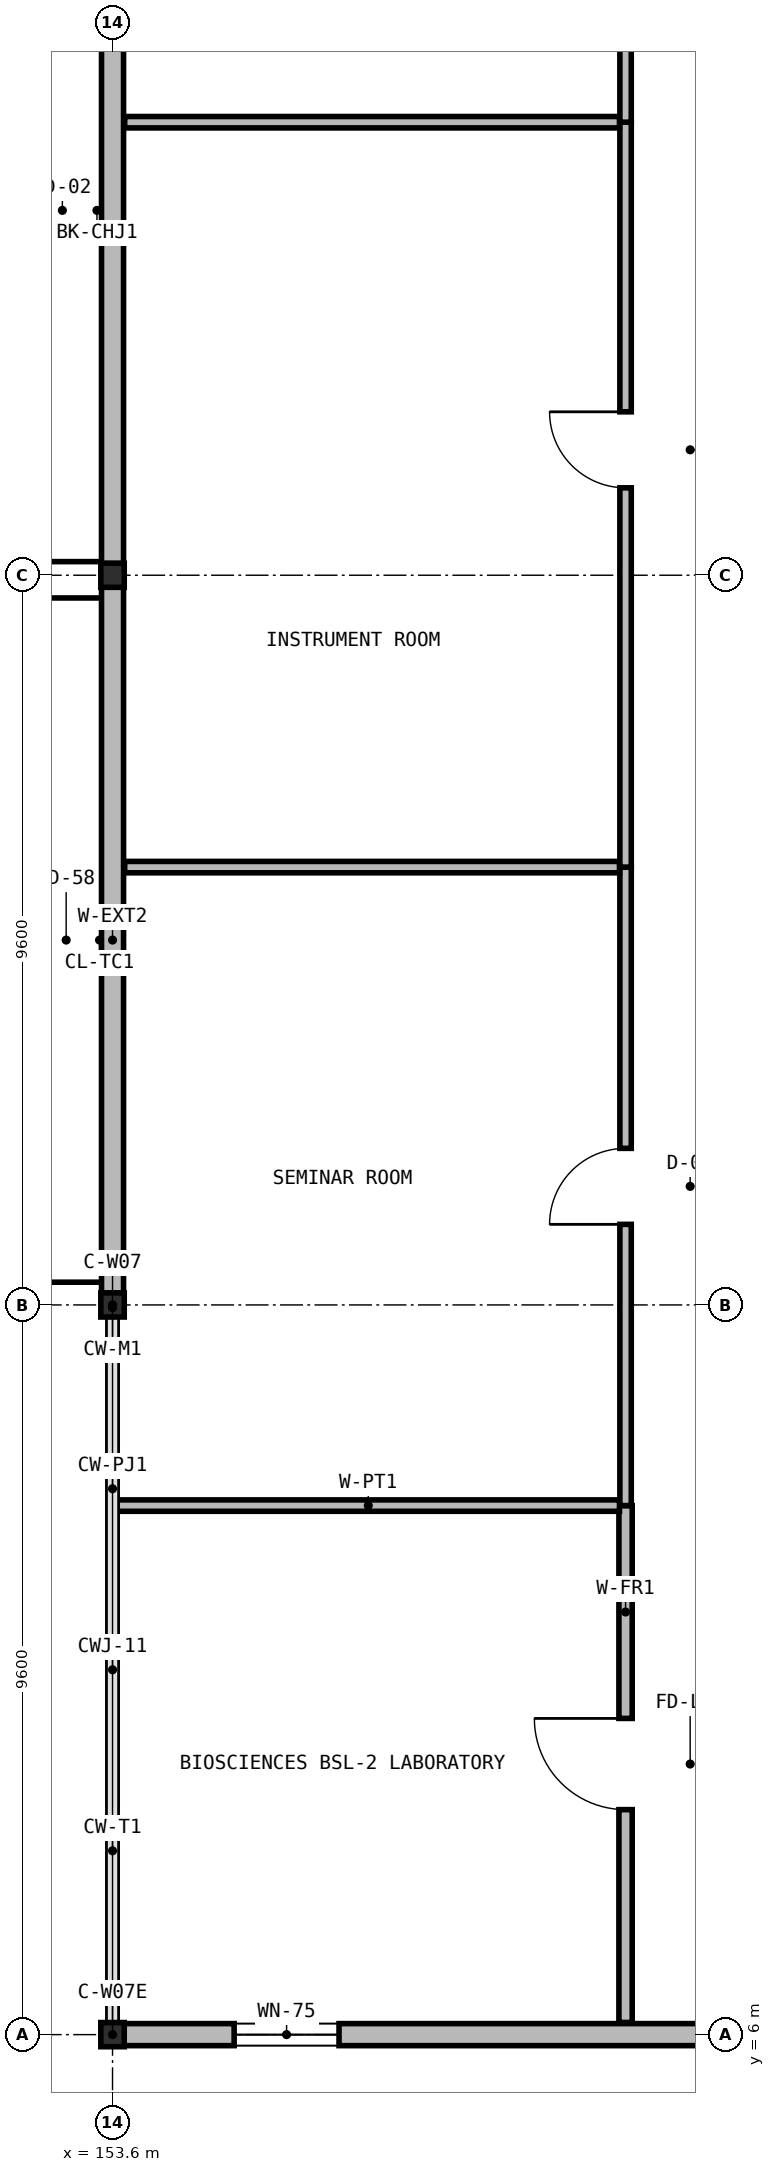
"""IFC4 building model, lengths in metres.
Left out: names, types, materials, properties, quantities, classifications, styles, units other than length and angle.
Written with IfcOpenShell. Run it as: python <this file> out.ifc"""

import sys

from ifc_helpers import new_model, si_unit, direction, frame, frame_2d, origin, origin_2d, place, context, subcontext, project, spatial, rectangle, i_section, extrude, element, fill, save


model = new_model("IFC4")
c1 = context("Model", 3, precision=1e-05, world=origin(), true_north=direction((0.0, 1.0)))
c2 = subcontext(c1, "Body", "Model", "MODEL_VIEW")
j1 = project(units=[si_unit("LENGTHUNIT", "METRE"), si_unit("PLANEANGLEUNIT", "RADIAN")], contexts=[c1])
p1 = place(None, origin())
s1 = spatial("IfcSite", under=j1, at=p1, CompositionType="ELEMENT")
p2 = place(p1, origin())
s2 = spatial("IfcBuilding", under=s1, at=p2, CompositionType="ELEMENT")
p3 = place(p2, frame((0.0, 0.0, 41.65)))
s3 = spatial("IfcBuildingStorey", under=s2, at=p3, CompositionType="ELEMENT", Elevation=41.65)
for number, where, z_axis, x_axis in (
    (1, (153.6, 6.0, 0.0), (0.0, 0.0, 1.0), (1.0, 0.0, 0.0)),
    (2, (153.6, 15.6, 0.0), (0.0, 0.0, 1.0), (1.0, 0.0, 0.0)),
    (3, (153.6, 25.2, 0.0), (0.0, 0.0, 1.0), (1.0, 0.0, 0.0)),
):
    element("IfcColumn", number, at=place(p3, frame(where, z_axis=z_axis, x_axis=x_axis)), inside=s3, PredefinedType="COLUMN", context=c2, shape_type="SweptSolid", body=[
        extrude(i_section(OverallWidth=0.308, OverallDepth=0.318, WebThickness=0.013, FlangeThickness=0.021, at=origin_2d()), origin(), (0.0, 0.0, 1.0), 4.55),
    ])
p4 = place(p3, frame((153.6, 15.604, 0.0), z_axis=(0.0, 0.0, 1.0), x_axis=(0.0, 1.0, 0.0)))
e4 = element("IfcWall", 4, at=p4, inside=s3, PredefinedType="SOLIDWALL", context=c2, shape_type="SweptSolid", body=[
    extrude(rectangle(XDim=9.592, YDim=0.29, at=frame_2d((4.796, 0.0))), origin(), (0.0, 0.0, 1.0), 3.831),
])
p5 = place(p3, frame((153.6, 25.204, 0.0), z_axis=(0.0, 0.0, 1.0), x_axis=(0.0, 1.0, 0.0)))
e5 = element("IfcWall", 5, at=p5, inside=s3, PredefinedType="SOLIDWALL", context=c2, shape_type="SweptSolid", body=[
    extrude(rectangle(XDim=9.592, YDim=0.29, at=frame_2d((4.796, 0.0))), origin(), (0.0, 0.0, 1.0), 3.831),
])
p6 = place(p3, frame((163.196, 6.0, 0.0), z_axis=(0.0, 0.0, 1.0), x_axis=(-1.0, 0.0, 0.0)))
e6 = element("IfcWall", 6, at=p6, inside=s3, PredefinedType="SOLIDWALL", context=c2, shape_type="SweptSolid", body=[
    extrude(rectangle(XDim=9.741, YDim=0.29, at=frame_2d((4.871, 0.0))), origin(), (0.0, 0.0, 1.0), 3.864),
])
p7 = place(p6, frame((6.616, 0.0, 0.95)))
e7 = element("IfcOpeningElement", 7, at=p7, cuts=e6, PredefinedType="OPENING", context=c2, shape_type="SweptSolid", body=[
    extrude(rectangle(XDim=1.38, YDim=1.56, at=frame_2d((0.69, 0.78))), frame((0.0, 0.155, 0.0), z_axis=(0.0, -1.0, 0.0), x_axis=(1.0, 0.0, 0.0)), (0.0, 0.0, 1.0), 0.31),
])
p8 = place(p3, frame((160.35, 6.16, 0.0), z_axis=(0.0, 0.0, 1.0), x_axis=(0.0, 1.0, 0.0)))
e8 = element("IfcWall", 8, at=p8, inside=s3, PredefinedType="PARTITIONING", context=c2, shape_type="SweptSolid", body=[
    extrude(rectangle(XDim=6.8, YDim=0.175, at=frame_2d((3.4, 0.0))), origin(), (0.0, 0.0, 1.0), 4.3),
])
p9 = place(p8, frame((2.8, 0.0, 0.0)))
e9 = element("IfcOpeningElement", 9, at=p9, cuts=e8, PredefinedType="OPENING", context=c2, shape_type="SweptSolid", body=[
    extrude(rectangle(XDim=1.2, YDim=2.2, at=frame_2d((0.6, 1.1))), frame((0.0, 0.097, 0.0), z_axis=(0.0, -1.0, 0.0), x_axis=(1.0, 0.0, 0.0)), (0.0, 0.0, 1.0), 0.195),
])
p10 = place(p3, frame((153.66, 12.96, 0.0), z_axis=(0.0, 0.0, 1.0), x_axis=(1.0, 0.0, 0.0)))
e10 = element("IfcWall", 10, at=p10, inside=s3, PredefinedType="PARTITIONING", context=c2, shape_type="SweptSolid", body=[
    extrude(rectangle(XDim=6.61, YDim=0.15, at=frame_2d((3.305, 0.0))), origin(), (0.0, 0.0, 1.0), 4.3),
])
p11 = place(p3, frame((160.35, 12.96, 0.0), z_axis=(0.0, 0.0, 1.0), x_axis=(0.0, 1.0, 0.0)))
e11 = element("IfcWall", 11, at=p11, inside=s3, PredefinedType="PARTITIONING", context=c2, shape_type="SweptSolid", body=[
    extrude(rectangle(XDim=8.4, YDim=0.15, at=frame_2d((4.2, 0.0))), origin(), (0.0, 0.0, 1.0), 4.3),
])
p12 = place(p11, frame((3.7, 0.0, 0.0)))
e12 = element("IfcOpeningElement", 12, at=p12, cuts=e11, PredefinedType="OPENING", context=c2, shape_type="SweptSolid", body=[
    extrude(rectangle(XDim=1.0, YDim=2.2, at=frame_2d((0.5, 1.1))), frame((0.0, 0.085, 0.0), z_axis=(0.0, -1.0, 0.0), x_axis=(1.0, 0.0, 0.0)), (0.0, 0.0, 1.0), 0.17),
])
p13 = place(p3, frame((153.76, 21.36, 0.0), z_axis=(0.0, 0.0, 1.0), x_axis=(1.0, 0.0, 0.0)))
e13 = element("IfcWall", 13, at=p13, inside=s3, PredefinedType="PARTITIONING", context=c2, shape_type="SweptSolid", body=[
    extrude(rectangle(XDim=6.51, YDim=0.15, at=frame_2d((3.255, 0.0))), origin(), (0.0, 0.0, 1.0), 4.3),
])
p14 = place(p3, frame((160.35, 21.36, 0.0), z_axis=(0.0, 0.0, 1.0), x_axis=(0.0, 1.0, 0.0)))
e14 = element("IfcWall", 14, at=p14, inside=s3, PredefinedType="PARTITIONING", context=c2, shape_type="SweptSolid", body=[
    extrude(rectangle(XDim=9.8, YDim=0.15, at=frame_2d((4.9, 0.0))), origin(), (0.0, 0.0, 1.0), 4.3),
])
p15 = place(p14, frame((4.99, 0.0, 0.0)))
e15 = element("IfcOpeningElement", 15, at=p15, cuts=e14, PredefinedType="OPENING", context=c2, shape_type="SweptSolid", body=[
    extrude(rectangle(XDim=1.0, YDim=2.2, at=frame_2d((0.5, 1.1))), frame((0.0, 0.085, 0.0), z_axis=(0.0, -1.0, 0.0), x_axis=(1.0, 0.0, 0.0)), (0.0, 0.0, 1.0), 0.17),
])
p16 = place(p3, frame((153.76, 31.16, 0.0), z_axis=(0.0, 0.0, 1.0), x_axis=(1.0, 0.0, 0.0)))
e16 = element("IfcWall", 16, at=p16, inside=s3, PredefinedType="PARTITIONING", context=c2, shape_type="SweptSolid", body=[
    extrude(rectangle(XDim=6.51, YDim=0.15, at=frame_2d((3.255, 0.0))), origin(), (0.0, 0.0, 1.0), 4.3),
])
p17 = place(p3, frame((160.35, 31.16, 0.0), z_axis=(0.0, 0.0, 1.0), x_axis=(0.0, 1.0, 0.0)))
e17 = element("IfcWall", 17, at=p17, inside=s3, PredefinedType="PARTITIONING", context=c2, shape_type="SweptSolid", body=[
    extrude(rectangle(XDim=7.2, YDim=0.15, at=frame_2d((3.6, 0.0))), origin(), (0.0, 0.0, 1.0), 4.3),
])
p18 = place(p17, frame((4.79, 0.0, 0.0)))
e18 = element("IfcOpeningElement", 18, at=p18, cuts=e17, PredefinedType="OPENING", context=c2, shape_type="SweptSolid", body=[
    extrude(rectangle(XDim=1.0, YDim=2.2, at=frame_2d((0.5, 1.1))), frame((0.0, 0.085, 0.0), z_axis=(0.0, -1.0, 0.0), x_axis=(1.0, 0.0, 0.0)), (0.0, 0.0, 1.0), 0.17),
])
p19 = place(p7, origin())
e19 = element("IfcWindow", 19, at=p19, inside=s3, PartitioningType="SINGLE_PANEL", PredefinedType="WINDOW", context=c2, shape_type="SweptSolid", body=[
    extrude(rectangle(XDim=1.38, YDim=1.56, at=frame_2d((0.69, 0.78))), frame((0.0, 0.03, 0.0), z_axis=(0.0, -1.0, 0.0), x_axis=(1.0, 0.0, 0.0)), (0.0, 0.0, 1.0), 0.06),
])
fill(e7, e19)
p20 = place(p9, origin())
e20 = element("IfcDoor", 20, at=p20, inside=s3, OperationType="SINGLE_SWING_RIGHT", PredefinedType="DOOR", context=c2, shape_type="SweptSolid", body=[
    extrude(rectangle(XDim=1.2, YDim=2.2, at=frame_2d((0.6, 1.1))), frame((0.0, 0.025, 0.0), z_axis=(0.0, -1.0, 0.0), x_axis=(1.0, 0.0, 0.0)), (0.0, 0.0, 1.0), 0.05),
])
fill(e9, e20)
p21 = place(p12, origin())
e21 = element("IfcDoor", 21, at=p21, inside=s3, OperationType="SINGLE_SWING_LEFT", PredefinedType="DOOR", context=c2, shape_type="SweptSolid", body=[
    extrude(rectangle(XDim=1.0, YDim=2.2, at=frame_2d((0.5, 1.1))), frame((0.0, 0.025, 0.0), z_axis=(0.0, -1.0, 0.0), x_axis=(1.0, 0.0, 0.0)), (0.0, 0.0, 1.0), 0.05),
])
fill(e12, e21)
p22 = place(p15, origin())
e22 = element("IfcDoor", 22, at=p22, inside=s3, OperationType="SINGLE_SWING_RIGHT", PredefinedType="DOOR", context=c2, shape_type="SweptSolid", body=[
    extrude(rectangle(XDim=1.0, YDim=2.2, at=frame_2d((0.5, 1.1))), frame((0.0, 0.025, 0.0), z_axis=(0.0, -1.0, 0.0), x_axis=(1.0, 0.0, 0.0)), (0.0, 0.0, 1.0), 0.05),
])
fill(e15, e22)
save(model, sys.argv[1])
